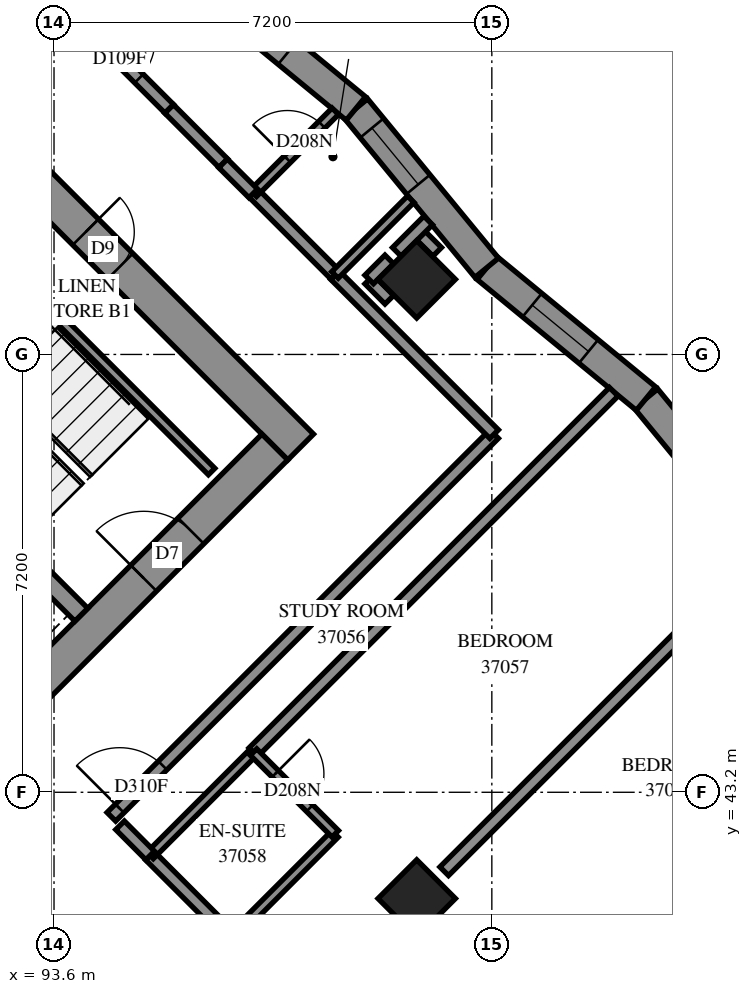
"""IFC4 building model, lengths in metres.
Left out: names, types, materials, properties, quantities, classifications, styles, units other than length and angle.
Written with IfcOpenShell. Run it as: python <this file> out.ifc"""

import sys

from ifc_helpers import new_model, si_unit, direction, frame, frame_2d, origin, origin_2d, place, context, subcontext, project, spatial, polyline, rectangle, outline, extrude, element, fill, save


model = new_model("IFC4")
c1 = context("Model", 3, precision=1e-05, world=origin(), true_north=direction((0.0, 1.0)))
c2 = subcontext(c1, "Body", "Model", "MODEL_VIEW")
j1 = project(units=[si_unit("LENGTHUNIT", "METRE"), si_unit("PLANEANGLEUNIT", "RADIAN")], contexts=[c1])
p1 = place(None, origin())
s1 = spatial("IfcSite", under=j1, at=p1, CompositionType="ELEMENT")
p2 = place(p1, origin())
s2 = spatial("IfcBuilding", under=s1, at=p2, CompositionType="ELEMENT")
p3 = place(p2, frame((0.0, 0.0, 138.8)))
s3 = spatial("IfcBuildingStorey", under=s2, at=p3, CompositionType="ELEMENT", Elevation=138.8)
for number, where, z_axis, x_axis in (
    (1, (99.565, 51.635, 0.0), (0.0, 0.0, 1.0), (0.707, -0.707, 0.0)),
    (2, (99.565, 41.453, 0.0), (0.0, 0.0, 1.0), (0.707, -0.707, 0.0)),
):
    element("IfcColumn", number, at=place(p3, frame(where, z_axis=z_axis, x_axis=x_axis)), inside=s3, PredefinedType="COLUMN", context=c2, shape_type="SweptSolid", body=[
        extrude(rectangle(XDim=0.9, YDim=0.9, at=origin_2d()), origin(), (0.0, 0.0, 1.0), 3.1),
    ])
p4 = place(p3, frame((86.625, 59.908, -0.3), z_axis=(0.0, 0.0, 1.0), x_axis=(0.7071067812, -0.7071067812, 0.0)))
e3 = element("IfcWall", 3, at=p4, inside=s3, PredefinedType="SHEAR", context=c2, shape_type="SweptSolid", body=[
    extrude(rectangle(XDim=15.6, YDim=0.6, at=frame_2d((7.8, 0.0))), origin(), (0.0, 0.0, 1.0), 2.7),
])
p5 = place(p4, frame((10.6, 0.0, 0.3)))
e4 = element("IfcOpeningElement", 4, at=p5, cuts=e3, PredefinedType="OPENING", context=c2, shape_type="SweptSolid", body=[
    extrude(rectangle(XDim=0.8, YDim=2.1, at=frame_2d((0.4, 1.05))), frame((0.0, 0.31, 0.0), z_axis=(0.0, -1.0, 0.0), x_axis=(1.0, 0.0, 0.0)), (0.0, 0.0, 1.0), 0.62),
])
p6 = place(p3, frame((87.049, 38.695, -0.3), z_axis=(0.0, 0.0, 1.0), x_axis=(0.7071067812, 0.7071067812, 0.0)))
e5 = element("IfcWall", 5, at=p6, inside=s3, PredefinedType="SHEAR", context=c2, shape_type="SweptSolid", body=[
    extrude(rectangle(XDim=14.4, YDim=0.6, at=frame_2d((7.2, 0.0))), origin(), (0.0, 0.0, 1.0), 2.7),
])
p7 = place(p6, frame((4.55, 0.0, 0.3)))
e6 = element("IfcOpeningElement", 6, at=p7, cuts=e5, PredefinedType="OPENING", context=c2, shape_type="SweptSolid", body=[
    extrude(rectangle(XDim=1.1, YDim=2.1, at=frame_2d((0.55, 1.05))), frame((0.0, 0.31, 0.0), z_axis=(0.0, -1.0, 0.0), x_axis=(1.0, 0.0, 0.0)), (0.0, 0.0, 1.0), 0.62),
])
p8 = place(p6, frame((11.35, 0.0, 0.3)))
e7 = element("IfcOpeningElement", 7, at=p8, cuts=e5, PredefinedType="OPENING", context=c2, shape_type="SweptSolid", body=[
    extrude(rectangle(XDim=1.1, YDim=2.1, at=frame_2d((0.55, 1.05))), frame((0.0, 0.31, 0.0), z_axis=(0.0, -1.0, 0.0), x_axis=(1.0, 0.0, 0.0)), (0.0, 0.0, 1.0), 0.62),
])
p9 = place(p3, frame((88.958, 51.211, 0.0), z_axis=(0.0, 0.0, 1.0), x_axis=(0.7070998367, -0.7071137256, 0.0)))
e8 = element("IfcWall", 8, at=p9, inside=s3, PredefinedType="SOLIDWALL", context=c2, shape_type="SweptSolid", body=[
    extrude(rectangle(XDim=7.2, YDim=0.3, at=frame_2d((3.6, 0.0))), origin(), (0.0, 0.0, 1.0), 3.1),
])
p10 = place(p3, frame((105.501, 47.038, 0.0), z_axis=(0.0, 0.0, 1.0), x_axis=(-0.6348900618, 0.7726024912, 0.0)))
e9 = element("IfcWall", 9, at=p10, inside=s3, PredefinedType="SOLIDWALL", context=c2, shape_type="SweptSolid", body=[
    extrude(outline(polyline([(0.046, -0.25), (3.436, -0.25), (3.387, 0.25), (-0.046, 0.25), (0.046, -0.25)])), origin(), (0.0, 0.0, 1.0), 3.1),
])
p11 = place(p10, frame((1.093, 0.0, 0.45)))
e10 = element("IfcOpeningElement", 10, at=p11, cuts=e9, PredefinedType="OPENING", context=c2, shape_type="SweptSolid", body=[
    extrude(rectangle(XDim=1.2, YDim=2.5, at=frame_2d((0.6, 1.25))), frame((0.0, 0.26, 0.0), z_axis=(0.0, -1.0, 0.0), x_axis=(1.0, 0.0, 0.0)), (0.0, 0.0, 1.0), 0.52),
])
p12 = place(p3, frame((103.335, 49.674, 0.0), z_axis=(0.0, 0.0, 1.0), x_axis=(-0.7725898055, 0.6349054988, 0.0)))
e11 = element("IfcWall", 11, at=p12, inside=s3, PredefinedType="SOLIDWALL", context=c2, shape_type="SweptSolid", body=[
    extrude(outline(polyline([(-0.025, -0.25), (3.365, -0.25), (3.414, 0.25), (0.025, 0.25), (-0.025, -0.25)])), origin(), (0.0, 0.0, 1.0), 3.1),
])
p13 = place(p12, frame((1.222, 0.0, 0.45)))
e12 = element("IfcOpeningElement", 12, at=p13, cuts=e11, PredefinedType="OPENING", context=c2, shape_type="SweptSolid", body=[
    extrude(rectangle(XDim=1.2, YDim=2.5, at=frame_2d((0.6, 1.25))), frame((0.0, 0.26, 0.0), z_axis=(0.0, -1.0, 0.0), x_axis=(1.0, 0.0, 0.0)), (0.0, 0.0, 1.0), 0.52),
])
p14 = place(p3, frame((100.716, 51.826, 0.0), z_axis=(0.0, 0.0, 1.0), x_axis=(-0.6349054988, 0.7725898055, 0.0)))
e13 = element("IfcWall", 13, at=p14, inside=s3, PredefinedType="SOLIDWALL", context=c2, shape_type="SweptSolid", body=[
    extrude(outline(polyline([(0.025, -0.25), (3.414, -0.25), (3.365, 0.25), (-0.025, 0.25), (0.025, -0.25)])), origin(), (0.0, 0.0, 1.0), 3.1),
])
p15 = place(p14, frame((1.774, 0.0, 0.45)))
e14 = element("IfcOpeningElement", 14, at=p15, cuts=e13, PredefinedType="OPENING", context=c2, shape_type="SweptSolid", body=[
    extrude(rectangle(XDim=1.2, YDim=2.5, at=frame_2d((0.6, 1.25))), frame((0.0, 0.26, 0.0), z_axis=(0.0, -1.0, 0.0), x_axis=(1.0, 0.0, 0.0)), (0.0, 0.0, 1.0), 0.52),
])
p16 = place(p3, frame((98.564, 54.445, 0.0), z_axis=(0.0, 0.0, 1.0), x_axis=(-0.7725898055, 0.6349054988, 0.0)))
e15 = element("IfcWall", 15, at=p16, inside=s3, PredefinedType="SOLIDWALL", context=c2, shape_type="SweptSolid", body=[
    extrude(outline(polyline([(-0.025, -0.25), (3.365, -0.25), (3.414, 0.25), (0.025, 0.25), (-0.025, -0.25)])), origin(), (0.0, 0.0, 1.0), 3.1),
])
p17 = place(p16, frame((1.45, 0.0, 0.45)))
e16 = element("IfcOpeningElement", 16, at=p17, cuts=e15, PredefinedType="OPENING", context=c2, shape_type="SweptSolid", body=[
    extrude(rectangle(XDim=1.2, YDim=2.5, at=frame_2d((0.6, 1.25))), frame((0.0, 0.26, 0.0), z_axis=(0.0, -1.0, 0.0), x_axis=(1.0, 0.0, 0.0)), (0.0, 0.0, 1.0), 0.52),
])
p18 = place(p3, frame((91.313, 53.354, 0.0), z_axis=(0.0, 0.0, 1.0), x_axis=(0.7071140275, -0.7070995348, 0.0)))
e17 = element("IfcWall", 17, at=p18, inside=s3, PredefinedType="PARTITIONING", context=c2, shape_type="SweptSolid", body=[
    extrude(rectangle(XDim=6.9, YDim=0.15, at=frame_2d((3.45, 0.0))), origin(), (0.0, 0.0, 1.0), 3.1),
])
p19 = place(p3, frame((88.326, 61.609, 0.0), z_axis=(0.0, 0.0, 1.0), x_axis=(0.7071067812, -0.7071067812, 0.0)))
e18 = element("IfcWall", 18, at=p19, inside=s3, PredefinedType="PARTITIONING", context=c2, shape_type="SweptSolid", body=[
    extrude(rectangle(XDim=10.14, YDim=0.2, at=frame_2d((5.07, 0.0))), origin(), (0.0, 0.0, 1.0), 3.1),
])
p20 = place(p19, frame((8.535, 0.0, 0.0)))
e19 = element("IfcOpeningElement", 19, at=p20, cuts=e18, PredefinedType="OPENING", context=c2, shape_type="SweptSolid", body=[
    extrude(rectangle(XDim=0.9, YDim=2.1, at=frame_2d((0.45, 1.05))), frame((0.0, 0.11, 0.0), z_axis=(0.0, -1.0, 0.0), x_axis=(1.0, 0.0, 0.0)), (0.0, 0.0, 1.0), 0.22),
])
p21 = place(p3, frame((93.127, 41.379, 0.0), z_axis=(0.0, 0.0, 1.0), x_axis=(0.7071067812, -0.7071067812, 0.0)))
e20 = element("IfcWall", 20, at=p21, inside=s3, PredefinedType="PARTITIONING", context=c2, shape_type="SweptSolid", body=[
    extrude(rectangle(XDim=9.39, YDim=0.2, at=frame_2d((4.695, 0.0))), origin(), (0.0, 0.0, 1.0), 3.1),
])
p22 = place(p21, frame((3.2, 0.0, 0.0)))
e21 = element("IfcOpeningElement", 21, at=p22, cuts=e20, PredefinedType="OPENING", context=c2, shape_type="SweptSolid", body=[
    extrude(rectangle(XDim=0.9, YDim=2.1, at=frame_2d((0.45, 1.05))), frame((0.0, 0.11, 0.0), z_axis=(0.0, -1.0, 0.0), x_axis=(1.0, 0.0, 0.0)), (0.0, 0.0, 1.0), 0.22),
])
p23 = place(p3, frame((94.543, 42.797, 0.0), z_axis=(0.0, 0.0, 1.0), x_axis=(0.7071067812, 0.7071067812, 0.0)))
e22 = element("IfcWall", 22, at=p23, inside=s3, PredefinedType="PARTITIONING", context=c2, shape_type="SweptSolid", body=[
    extrude(rectangle(XDim=8.901, YDim=0.2, at=frame_2d((4.45, 0.0))), origin(), (0.0, 0.0, 1.0), 3.1),
])
p24 = place(p23, frame((0.193, 0.0, 0.0)))
e23 = element("IfcOpeningElement", 23, at=p24, cuts=e22, PredefinedType="OPENING", context=c2, shape_type="SweptSolid", body=[
    extrude(rectangle(XDim=1.0, YDim=2.1, at=frame_2d((0.5, 1.05))), frame((0.0, 0.11, 0.0), z_axis=(0.0, -1.0, 0.0), x_axis=(1.0, 0.0, 0.0)), (0.0, 0.0, 1.0), 0.22),
])
p25 = place(p3, frame((95.177, 42.157, 0.0), z_axis=(0.0, 0.0, 1.0), x_axis=(0.7071067812, -0.7071067812, 0.0)))
e24 = element("IfcWall", 24, at=p25, inside=s3, PredefinedType="PARTITIONING", context=c2, shape_type="SweptSolid", body=[
    extrude(rectangle(XDim=8.491, YDim=0.2, at=frame_2d((4.245, 0.0))), origin(), (0.0, 0.0, 1.0), 3.1),
])
p26 = place(p25, frame((2.3, 0.0, 0.0)))
e25 = element("IfcOpeningElement", 25, at=p26, cuts=e24, PredefinedType="OPENING", context=c2, shape_type="SweptSolid", body=[
    extrude(rectangle(XDim=0.9, YDim=2.1, at=frame_2d((0.45, 1.05))), frame((0.0, 0.11, 0.0), z_axis=(0.0, -1.0, 0.0), x_axis=(1.0, 0.0, 0.0)), (0.0, 0.0, 1.0), 0.22),
])
p27 = place(p25, frame((3.95, 0.0, 0.0)))
e26 = element("IfcOpeningElement", 26, at=p27, cuts=e24, PredefinedType="OPENING", context=c2, shape_type="SweptSolid", body=[
    extrude(rectangle(XDim=0.9, YDim=2.1, at=frame_2d((0.45, 1.05))), frame((0.0, 0.11, 0.0), z_axis=(0.0, -1.0, 0.0), x_axis=(1.0, 0.0, 0.0)), (0.0, 0.0, 1.0), 0.22),
])
p28 = place(p3, frame((96.877, 43.859, 0.0), z_axis=(0.0, 0.0, 1.0), x_axis=(0.707112746, 0.7071008163, 0.0)))
e27 = element("IfcWall", 27, at=p28, inside=s3, PredefinedType="PARTITIONING", context=c2, shape_type="SweptSolid", body=[
    extrude(rectangle(XDim=8.382, YDim=0.2, at=frame_2d((4.191, 0.0))), origin(), (0.0, 0.0, 1.0), 3.1),
])
p29 = place(p3, frame((100.017, 41.901, 0.0), z_axis=(0.0, 0.0, 1.0), x_axis=(0.7072754814, 0.7069380408, 0.0)))
e28 = element("IfcWall", 28, at=p29, inside=s3, PredefinedType="PARTITIONING", context=c2, shape_type="SweptSolid", body=[
    extrude(rectangle(XDim=5.927, YDim=0.2, at=frame_2d((2.963, 0.0))), origin(), (0.0, 0.0, 1.0), 3.1),
])
p30 = place(p3, frame((98.221, 51.705, 0.0), z_axis=(0.0, 0.0, 1.0), x_axis=(0.7073229887, -0.7068905075, 0.0)))
e29 = element("IfcWall", 29, at=p30, inside=s3, PredefinedType="PARTITIONING", context=c2, shape_type="SweptSolid", body=[
    extrude(rectangle(XDim=3.7, YDim=0.2, at=frame_2d((1.85, 0.0))), origin(), (0.0, 0.0, 1.0), 3.1),
])
for number, where, z_axis, x_axis in (
    (30, (96.523, 40.817, 0.0), (0.0, 0.0, 1.0), (0.707, 0.707, 0.0)),
    (31, (95.179, 42.161, 0.0), (0.0, 0.0, 1.0), (0.707, 0.707, 0.0)),
):
    element("IfcWall", number, at=place(p3, frame(where, z_axis=z_axis, x_axis=x_axis)), inside=s3, PredefinedType="PARTITIONING", context=c2, shape_type="SweptSolid", body=[
        extrude(rectangle(XDim=2.401, YDim=0.15, at=frame_2d((1.201, 0.0))), origin(), (0.0, 0.0, 1.0), 3.1),
    ])
p31 = place(p3, frame((96.882, 53.053, 0.0), z_axis=(0.0, 0.0, 1.0), x_axis=(0.7071067812, -0.7071067812, 0.0)))
e32 = element("IfcWall", 32, at=p31, inside=s3, PredefinedType="PARTITIONING", context=c2, shape_type="SweptSolid", body=[
    extrude(rectangle(XDim=1.901, YDim=0.2, at=frame_2d((0.95, 0.0))), origin(), (0.0, 0.0, 1.0), 3.1),
])
p32 = place(p3, frame((96.881, 43.861, 0.0), z_axis=(0.0, 0.0, 1.0), x_axis=(0.7071067812, -0.7071067812, 0.0)))
e33 = element("IfcWall", 33, at=p32, inside=s3, PredefinedType="PARTITIONING", context=c2, shape_type="SweptSolid", body=[
    extrude(rectangle(XDim=1.901, YDim=0.15, at=frame_2d((0.95, 0.0))), origin(), (0.0, 0.0, 1.0), 3.1),
])
p33 = place(p32, frame((0.505, 0.0, 0.0)))
e34 = element("IfcOpeningElement", 34, at=p33, cuts=e33, PredefinedType="OPENING", context=c2, shape_type="SweptSolid", body=[
    extrude(rectangle(XDim=0.8, YDim=2.1, at=frame_2d((0.4, 1.05))), frame((0.0, 0.085, 0.0), z_axis=(0.0, -1.0, 0.0), x_axis=(1.0, 0.0, 0.0)), (0.0, 0.0, 1.0), 0.17),
])
p34 = place(p3, frame((96.877, 53.051, 0.0), z_axis=(0.0, 0.0, 1.0), x_axis=(0.7071330019, 0.7070805595, 0.0)))
e35 = element("IfcWall", 35, at=p34, inside=s3, PredefinedType="PARTITIONING", context=c2, shape_type="SweptSolid", body=[
    extrude(rectangle(XDim=1.907, YDim=0.15, at=frame_2d((0.954, 0.0))), origin(), (0.0, 0.0, 1.0), 3.1),
])
p35 = place(p34, frame((0.793, 0.0, 0.0)))
e36 = element("IfcOpeningElement", 36, at=p35, cuts=e35, PredefinedType="OPENING", context=c2, shape_type="SweptSolid", body=[
    extrude(rectangle(XDim=0.8, YDim=2.1, at=frame_2d((0.4, 1.05))), frame((0.0, 0.085, 0.0), z_axis=(0.0, -1.0, 0.0), x_axis=(1.0, 0.0, 0.0)), (0.0, 0.0, 1.0), 0.17),
])
p36 = place(p3, frame((98.221, 51.707, 0.0), z_axis=(0.0, 0.0, 1.0), x_axis=(0.7071351659, 0.7070783953, 0.0)))
e37 = element("IfcWall", 37, at=p36, inside=s3, PredefinedType="PARTITIONING", context=c2, shape_type="SweptSolid", body=[
    extrude(rectangle(XDim=1.762, YDim=0.15, at=frame_2d((0.881, 0.0))), origin(), (0.0, 0.0, 1.0), 3.1),
])
p37 = place(p3, frame((95.494, 54.438, 0.0), z_axis=(0.0, 0.0, 1.0), x_axis=(0.706312726, -0.7078999456, 0.0)))
e38 = element("IfcWall", 38, at=p37, inside=s3, PredefinedType="PARTITIONING", context=c2, shape_type="SweptSolid", body=[
    extrude(rectangle(XDim=1.26, YDim=0.2, at=frame_2d((0.63, 0.0))), origin(), (0.0, 0.0, 1.0), 3.1),
])
for number, where, z_axis, x_axis in (
    (39, (96.38, 53.542, 0.0), (0.0, 0.0, 1.0), (0.709, -0.706, 0.0)),
    (40, (94.686, 42.656, 0.0), (0.0, 0.0, 1.0), (0.706, -0.709, 0.0)),
):
    element("IfcWall", number, at=place(p3, frame(where, z_axis=z_axis, x_axis=x_axis)), inside=s3, PredefinedType="PARTITIONING", context=c2, shape_type="SweptSolid", body=[
        extrude(rectangle(XDim=0.7, YDim=0.2, at=frame_2d((0.35, 0.0))), origin(), (0.0, 0.0, 1.0), 3.1),
    ])
for number, where, z_axis, x_axis in (
    (41, (99.57, 52.418, 0.0), (0.0, 0.0, 1.0), (0.709, -0.705, 0.0)),
    (42, (98.784, 51.632, 0.0), (0.0, 0.0, 1.0), (0.705, -0.709, 0.0)),
):
    element("IfcWall", number, at=place(p3, frame(where, z_axis=z_axis, x_axis=x_axis)), inside=s3, PredefinedType="PARTITIONING", context=c2, shape_type="SweptSolid", body=[
        extrude(rectangle(XDim=0.468, YDim=0.2, at=frame_2d((0.234, 0.0))), origin(), (0.0, 0.0, 1.0), 3.1),
    ])
p38 = place(p3, frame((98.783, 51.633, 0.0), z_axis=(0.0, 0.0, 1.0), x_axis=(0.7071067812, 0.7071067812, 0.0)))
e43 = element("IfcWall", 43, at=p38, inside=s3, PredefinedType="PARTITIONING", context=c2, shape_type="SweptSolid", body=[
    extrude(rectangle(XDim=0.467, YDim=0.2, at=frame_2d((0.233, 0.0))), origin(), (0.0, 0.0, 1.0), 3.1),
])
p39 = place(p3, frame((99.237, 52.087, 0.0), z_axis=(0.0, 0.0, 1.0), x_axis=(0.7071752363, 0.7070383195, 0.0)))
e44 = element("IfcWall", 44, at=p39, inside=s3, PredefinedType="PARTITIONING", context=c2, shape_type="SweptSolid", body=[
    extrude(rectangle(XDim=0.73, YDim=0.2, at=frame_2d((0.365, 0.0))), origin(), (0.0, 0.0, 1.0), 3.1),
])
p40 = place(p13, origin())
e45 = element("IfcWindow", 45, at=p40, inside=s3, PartitioningType="SINGLE_PANEL", PredefinedType="WINDOW", context=c2, shape_type="SweptSolid", body=[
    extrude(rectangle(XDim=1.2, YDim=2.5, at=frame_2d((0.6, 1.25))), frame((0.0, 0.18, 0.0), z_axis=(0.0, -1.0, 0.0), x_axis=(1.0, 0.0, 0.0)), (0.0, 0.0, 1.0), 0.06),
])
fill(e12, e45)
p41 = place(p15, origin())
e46 = element("IfcWindow", 46, at=p41, inside=s3, PartitioningType="SINGLE_PANEL", PredefinedType="WINDOW", context=c2, shape_type="SweptSolid", body=[
    extrude(rectangle(XDim=1.2, YDim=2.5, at=frame_2d((0.6, 1.25))), frame((0.0, 0.18, 0.0), z_axis=(0.0, -1.0, 0.0), x_axis=(1.0, 0.0, 0.0)), (0.0, 0.0, 1.0), 0.06),
])
fill(e14, e46)
p42 = place(p17, origin())
e47 = element("IfcWindow", 47, at=p42, inside=s3, PartitioningType="SINGLE_PANEL", PredefinedType="WINDOW", context=c2, shape_type="SweptSolid", body=[
    extrude(rectangle(XDim=1.2, YDim=2.5, at=frame_2d((0.6, 1.25))), frame((0.0, 0.18, 0.0), z_axis=(0.0, -1.0, 0.0), x_axis=(1.0, 0.0, 0.0)), (0.0, 0.0, 1.0), 0.06),
])
fill(e16, e47)
p43 = place(p5, origin())
e48 = element("IfcDoor", 48, at=p43, inside=s3, OperationType="SINGLE_SWING_RIGHT", PredefinedType="DOOR", context=c2, shape_type="SweptSolid", body=[
    extrude(rectangle(XDim=0.8, YDim=2.1, at=frame_2d((0.4, 1.05))), frame((0.0, 0.025, 0.0), z_axis=(0.0, -1.0, 0.0), x_axis=(1.0, 0.0, 0.0)), (0.0, 0.0, 1.0), 0.05),
])
fill(e4, e48)
p44 = place(p8, origin())
e49 = element("IfcDoor", 49, at=p44, inside=s3, OperationType="SINGLE_SWING_RIGHT", PredefinedType="DOOR", context=c2, shape_type="SweptSolid", body=[
    extrude(rectangle(XDim=1.1, YDim=2.1, at=frame_2d((0.55, 1.05))), frame((0.0, 0.025, 0.0), z_axis=(0.0, -1.0, 0.0), x_axis=(1.0, 0.0, 0.0)), (0.0, 0.0, 1.0), 0.05),
])
fill(e7, e49)
p45 = place(p20, origin())
e50 = element("IfcDoor", 50, at=p45, inside=s3, OperationType="SINGLE_SWING_LEFT", PredefinedType="DOOR", context=c2, shape_type="SweptSolid", body=[
    extrude(rectangle(XDim=0.9, YDim=2.1, at=frame_2d((0.45, 1.05))), frame((0.0, 0.025, 0.0), z_axis=(0.0, -1.0, 0.0), x_axis=(1.0, 0.0, 0.0)), (0.0, 0.0, 1.0), 0.05),
])
fill(e19, e50)
p46 = place(p35, origin())
e51 = element("IfcDoor", 51, at=p46, inside=s3, OperationType="SINGLE_SWING_RIGHT", PredefinedType="DOOR", context=c2, shape_type="SweptSolid", body=[
    extrude(rectangle(XDim=0.8, YDim=2.1, at=frame_2d((0.4, 1.05))), frame((0.0, 0.025, 0.0), z_axis=(0.0, -1.0, 0.0), x_axis=(1.0, 0.0, 0.0)), (0.0, 0.0, 1.0), 0.05),
])
fill(e36, e51)
p47 = place(p24, origin())
e52 = element("IfcDoor", 52, at=p47, inside=s3, OperationType="SINGLE_SWING_LEFT", PredefinedType="DOOR", context=c2, shape_type="SweptSolid", body=[
    extrude(rectangle(XDim=1.0, YDim=2.1, at=frame_2d((0.5, 1.05))), frame((0.0, 0.025, 0.0), z_axis=(0.0, -1.0, 0.0), x_axis=(1.0, 0.0, 0.0)), (0.0, 0.0, 1.0), 0.05),
])
fill(e23, e52)
p48 = place(p33, origin())
e53 = element("IfcDoor", 53, at=p48, inside=s3, OperationType="SINGLE_SWING_RIGHT", PredefinedType="DOOR", context=c2, shape_type="SweptSolid", body=[
    extrude(rectangle(XDim=0.8, YDim=2.1, at=frame_2d((0.4, 1.05))), frame((0.0, 0.025, 0.0), z_axis=(0.0, -1.0, 0.0), x_axis=(1.0, 0.0, 0.0)), (0.0, 0.0, 1.0), 0.05),
])
fill(e34, e53)
save(model, sys.argv[1])
